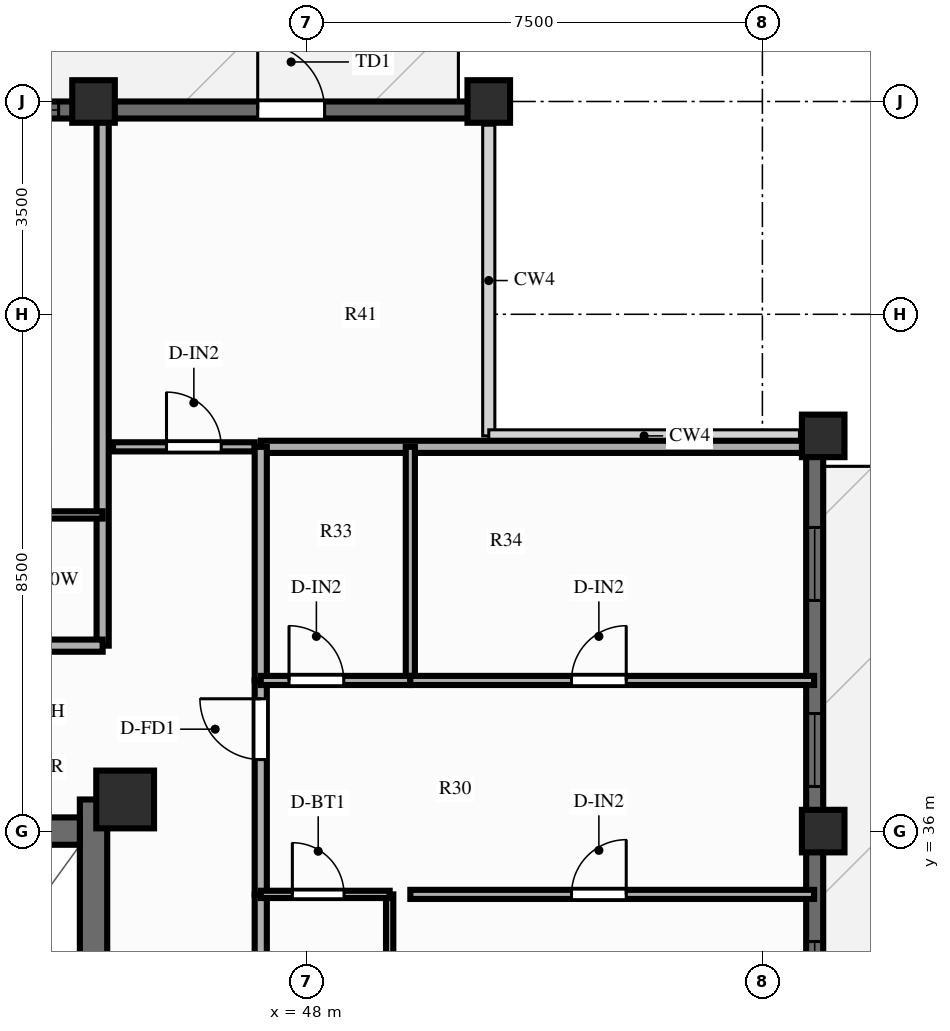
"""IFC4 building model, lengths in metres.
Left out: names, types, materials, properties, quantities, classifications, styles, units other than length and angle.
Written with IfcOpenShell. Run it as: python <this file> out.ifc"""

import sys

from ifc_helpers import new_model, si_unit, direction, frame, frame_2d, origin, origin_2d, place, context, subcontext, project, spatial, rectangle, extrude, source, transform, mapped, element, fill, save


model = new_model("IFC4")
c1 = context("Model", 3, precision=1e-05, world=origin(), true_north=direction((0.0, 1.0)))
c2 = subcontext(c1, "Body", "Model", "MODEL_VIEW")
j1 = project(units=[si_unit("LENGTHUNIT", "METRE"), si_unit("PLANEANGLEUNIT", "RADIAN")], contexts=[c1])
p1 = place(None, origin())
s1 = spatial("IfcSite", under=j1, at=p1, CompositionType="ELEMENT")
p2 = place(p1, origin())
s2 = spatial("IfcBuilding", under=s1, at=p2, CompositionType="ELEMENT")
p3 = place(p2, frame((0.0, 0.0, 216.3)))
s3 = spatial("IfcBuildingStorey", under=s2, at=p3, CompositionType="ELEMENT", Elevation=216.3)
p4 = place(p3, frame((44.5, 17.48, 0.0), z_axis=(0.0, 0.0, 1.0), x_axis=(0.0, 1.0, 0.0)))
e1 = element("IfcWall", 1, at=p4, inside=s3, PredefinedType="SHEAR", context=c2, shape_type="SweptSolid", body=[
    extrude(rectangle(XDim=19.04, YDim=0.45, at=frame_2d((9.52, 0.0))), origin(), (0.0, 0.0, 1.0), 3.9),
])
p5 = place(p4, frame((12.67, 0.0, 0.0), z_axis=(0.0, 0.0, 1.0), x_axis=(-1.0, 0.0, 0.0)))
e2 = element("IfcOpeningElement", 2, at=p5, cuts=e1, PredefinedType="OPENING", context=c2, shape_type="SweptSolid", body=[
    extrude(rectangle(XDim=1.1, YDim=2.15, at=frame_2d((0.55, 1.075))), frame((0.0, 0.237, 0.0), z_axis=(0.0, -1.0, 0.0), x_axis=(1.0, 0.0, 0.0)), (0.0, 0.0, 1.0), 0.474),
])
p6 = place(p3, frame((31.725, 36.0, 0.0), z_axis=(0.0, 0.0, 1.0), x_axis=(1.0, 0.0, 0.0)))
e3 = element("IfcWall", 3, at=p6, inside=s3, PredefinedType="SHEAR", context=c2, shape_type="SweptSolid", body=[
    extrude(rectangle(XDim=12.55, YDim=0.45, at=frame_2d((6.275, 0.0))), origin(), (0.0, 0.0, 1.0), 3.9),
])
p7 = place(p6, frame((5.225, 0.0, 0.0), z_axis=(0.0, 0.0, 1.0), x_axis=(-1.0, 0.0, 0.0)))
e4 = element("IfcOpeningElement", 4, at=p7, cuts=e3, PredefinedType="OPENING", context=c2, shape_type="SweptSolid", body=[
    extrude(rectangle(XDim=1.4, YDim=2.15, at=frame_2d((0.7, 1.075))), frame((0.0, 0.237, 0.0), z_axis=(0.0, -1.0, 0.0), x_axis=(1.0, 0.0, 0.0)), (0.0, 0.0, 1.0), 0.474),
])
m1 = source(origin(), c2, "Body", "SweptSolid", [
    extrude(rectangle(XDim=0.95, YDim=0.95, at=origin_2d()), origin(), (0.0, 0.0, 1.0), 3.9),
])
p8 = place(p3, frame((45.02, 36.52, 0.0), z_axis=(0.0, 0.0, 1.0), x_axis=(1.0, 0.0, 0.0)))
e5 = element("IfcColumn", 5, at=p8, inside=s3, PredefinedType="COLUMN", context=c2, shape_type="MappedRepresentation", body=[
    mapped(m1, transform((0.0, 0.0, 0.0), scale=1.0)),
])
m2 = source(origin(), c2, "Body", "SweptSolid", [
    extrude(rectangle(XDim=0.7, YDim=0.7, at=origin_2d()), origin(), (0.0, 0.0, 1.0), 3.9),
])
for number, where, z_axis, x_axis in (
    (6, (56.5, 36.0, 0.0), (0.0, 0.0, 1.0), (1.0, 0.0, 0.0)),
    (7, (56.5, 42.5, 0.0), (0.0, 0.0, 1.0), (1.0, 0.0, 0.0)),
    (8, (51.0, 48.0, 0.0), (0.0, 0.0, 1.0), (1.0, 0.0, 0.0)),
    (9, (44.5, 48.0, 0.0), (0.0, 0.0, 1.0), (1.0, 0.0, 0.0)),
):
    element("IfcColumn", number, at=place(p3, frame(where, z_axis=z_axis, x_axis=x_axis)), inside=s3, PredefinedType="COLUMN", context=c2, shape_type="MappedRepresentation", body=[
        mapped(m2, transform((0.0, 0.0, 0.0), scale=1.0)),
    ])
p9 = place(p3, frame((25.0, 47.86, 0.0), z_axis=(0.0, 0.0, 1.0), x_axis=(1.0, 0.0, 0.0)))
e10 = element("IfcWall", 10, at=p9, inside=s3, PredefinedType="SOLIDWALL", context=c2, shape_type="SweptSolid", body=[
    extrude(rectangle(XDim=26.0, YDim=0.28, at=frame_2d((13.0, 0.0))), origin(), (0.0, 0.0, 1.0), 2.44),
])
p10 = place(p9, frame((2.65, 0.0, 0.25)))
e11 = element("IfcOpeningElement", 11, at=p10, cuts=e10, PredefinedType="OPENING", context=c2, shape_type="SweptSolid", body=[
    extrude(rectangle(XDim=1.2, YDim=1.5, at=frame_2d((0.6, 0.75))), frame((0.0, 0.152, 0.0), z_axis=(0.0, -1.0, 0.0), x_axis=(1.0, 0.0, 0.0)), (0.0, 0.0, 1.0), 0.304),
])
p11 = place(p9, frame((7.12, 0.0, 0.25)))
e12 = element("IfcOpeningElement", 12, at=p11, cuts=e10, PredefinedType="OPENING", context=c2, shape_type="SweptSolid", body=[
    extrude(rectangle(XDim=0.95, YDim=1.5, at=frame_2d((0.475, 0.75))), frame((0.0, 0.152, 0.0), z_axis=(0.0, -1.0, 0.0), x_axis=(1.0, 0.0, 0.0)), (0.0, 0.0, 1.0), 0.304),
])
p12 = place(p9, frame((9.311, 0.0, 0.25)))
e13 = element("IfcOpeningElement", 13, at=p12, cuts=e10, PredefinedType="OPENING", context=c2, shape_type="SweptSolid", body=[
    extrude(rectangle(XDim=1.2, YDim=1.5, at=frame_2d((0.6, 0.75))), frame((0.0, 0.152, 0.0), z_axis=(0.0, -1.0, 0.0), x_axis=(1.0, 0.0, 0.0)), (0.0, 0.0, 1.0), 0.304),
])
p13 = place(p9, frame((12.377, 0.0, 0.25)))
e14 = element("IfcOpeningElement", 14, at=p13, cuts=e10, PredefinedType="OPENING", context=c2, shape_type="SweptSolid", body=[
    extrude(rectangle(XDim=1.2, YDim=1.5, at=frame_2d((0.6, 0.75))), frame((0.0, 0.152, 0.0), z_axis=(0.0, -1.0, 0.0), x_axis=(1.0, 0.0, 0.0)), (0.0, 0.0, 1.0), 0.304),
])
p14 = place(p9, frame((15.387, 0.0, 0.25)))
e15 = element("IfcOpeningElement", 15, at=p14, cuts=e10, PredefinedType="OPENING", context=c2, shape_type="SweptSolid", body=[
    extrude(rectangle(XDim=1.2, YDim=1.5, at=frame_2d((0.6, 0.75))), frame((0.0, 0.152, 0.0), z_axis=(0.0, -1.0, 0.0), x_axis=(1.0, 0.0, 0.0)), (0.0, 0.0, 1.0), 0.304),
])
p15 = place(p9, frame((17.726, 0.0, 0.25)))
e16 = element("IfcOpeningElement", 16, at=p15, cuts=e10, PredefinedType="OPENING", context=c2, shape_type="SweptSolid", body=[
    extrude(rectangle(XDim=1.2, YDim=1.5, at=frame_2d((0.6, 0.75))), frame((0.0, 0.152, 0.0), z_axis=(0.0, -1.0, 0.0), x_axis=(1.0, 0.0, 0.0)), (0.0, 0.0, 1.0), 0.304),
])
p16 = place(p9, frame((22.2, 0.0, 0.0)))
e17 = element("IfcOpeningElement", 17, at=p16, cuts=e10, PredefinedType="OPENING", context=c2, shape_type="SweptSolid", body=[
    extrude(rectangle(XDim=1.1, YDim=2.15, at=frame_2d((0.55, 1.075))), frame((0.0, 0.152, 0.0), z_axis=(0.0, -1.0, 0.0), x_axis=(1.0, 0.0, 0.0)), (0.0, 0.0, 1.0), 0.304),
])
p17 = place(p3, frame((56.36, 11.5, 0.0), z_axis=(0.0, 0.0, 1.0), x_axis=(0.0, 1.0, 0.0)))
e18 = element("IfcWall", 18, at=p17, inside=s3, PredefinedType="SOLIDWALL", context=c2, shape_type="SweptSolid", body=[
    extrude(rectangle(XDim=31.0, YDim=0.28, at=frame_2d((15.5, 0.0))), origin(), (0.0, 0.0, 1.0), 2.44),
])
p18 = place(p17, frame((0.96, 0.0, 0.25)))
e19 = element("IfcOpeningElement", 19, at=p18, cuts=e18, PredefinedType="OPENING", context=c2, shape_type="SweptSolid", body=[
    extrude(rectangle(XDim=1.2, YDim=1.5, at=frame_2d((0.6, 0.75))), frame((0.0, 0.152, 0.0), z_axis=(0.0, -1.0, 0.0), x_axis=(1.0, 0.0, 0.0)), (0.0, 0.0, 1.0), 0.304),
])
p19 = place(p17, frame((4.02, 0.0, 0.25)))
e20 = element("IfcOpeningElement", 20, at=p19, cuts=e18, PredefinedType="OPENING", context=c2, shape_type="SweptSolid", body=[
    extrude(rectangle(XDim=1.2, YDim=1.5, at=frame_2d((0.6, 0.75))), frame((0.0, 0.152, 0.0), z_axis=(0.0, -1.0, 0.0), x_axis=(1.0, 0.0, 0.0)), (0.0, 0.0, 1.0), 0.304),
])
p20 = place(p17, frame((8.089, 0.0, 0.25)))
e21 = element("IfcOpeningElement", 21, at=p20, cuts=e18, PredefinedType="OPENING", context=c2, shape_type="SweptSolid", body=[
    extrude(rectangle(XDim=1.2, YDim=1.5, at=frame_2d((0.6, 0.75))), frame((0.0, 0.152, 0.0), z_axis=(0.0, -1.0, 0.0), x_axis=(1.0, 0.0, 0.0)), (0.0, 0.0, 1.0), 0.304),
])
p21 = place(p17, frame((11.373, 0.0, 0.25)))
e22 = element("IfcOpeningElement", 22, at=p21, cuts=e18, PredefinedType="OPENING", context=c2, shape_type="SweptSolid", body=[
    extrude(rectangle(XDim=1.2, YDim=1.5, at=frame_2d((0.6, 0.75))), frame((0.0, 0.152, 0.0), z_axis=(0.0, -1.0, 0.0), x_axis=(1.0, 0.0, 0.0)), (0.0, 0.0, 1.0), 0.304),
])
p22 = place(p17, frame((15.907, 0.0, 0.0), z_axis=(0.0, 0.0, 1.0), x_axis=(-1.0, 0.0, 0.0)))
e23 = element("IfcOpeningElement", 23, at=p22, cuts=e18, PredefinedType="OPENING", context=c2, shape_type="SweptSolid", body=[
    extrude(rectangle(XDim=1.6, YDim=2.15, at=frame_2d((0.8, 1.075))), frame((0.0, 0.152, 0.0), z_axis=(0.0, -1.0, 0.0), x_axis=(1.0, 0.0, 0.0)), (0.0, 0.0, 1.0), 0.304),
])
p23 = place(p17, frame((18.188, 0.0, 0.25)))
e24 = element("IfcOpeningElement", 24, at=p23, cuts=e18, PredefinedType="OPENING", context=c2, shape_type="SweptSolid", body=[
    extrude(rectangle(XDim=1.2, YDim=1.5, at=frame_2d((0.6, 0.75))), frame((0.0, 0.152, 0.0), z_axis=(0.0, -1.0, 0.0), x_axis=(1.0, 0.0, 0.0)), (0.0, 0.0, 1.0), 0.304),
])
p24 = place(p17, frame((21.484, 0.0, 0.25)))
e25 = element("IfcOpeningElement", 25, at=p24, cuts=e18, PredefinedType="OPENING", context=c2, shape_type="SweptSolid", body=[
    extrude(rectangle(XDim=1.2, YDim=1.5, at=frame_2d((0.6, 0.75))), frame((0.0, 0.152, 0.0), z_axis=(0.0, -1.0, 0.0), x_axis=(1.0, 0.0, 0.0)), (0.0, 0.0, 1.0), 0.304),
])
p25 = place(p17, frame((25.234, 0.0, 0.25)))
e26 = element("IfcOpeningElement", 26, at=p25, cuts=e18, PredefinedType="OPENING", context=c2, shape_type="SweptSolid", body=[
    extrude(rectangle(XDim=1.2, YDim=1.5, at=frame_2d((0.6, 0.75))), frame((0.0, 0.152, 0.0), z_axis=(0.0, -1.0, 0.0), x_axis=(1.0, 0.0, 0.0)), (0.0, 0.0, 1.0), 0.304),
])
p26 = place(p17, frame((28.294, 0.0, 0.25)))
e27 = element("IfcOpeningElement", 27, at=p26, cuts=e18, PredefinedType="OPENING", context=c2, shape_type="SweptSolid", body=[
    extrude(rectangle(XDim=1.2, YDim=1.5, at=frame_2d((0.6, 0.75))), frame((0.0, 0.152, 0.0), z_axis=(0.0, -1.0, 0.0), x_axis=(1.0, 0.0, 0.0)), (0.0, 0.0, 1.0), 0.304),
])
p27 = place(p3, frame((44.82, 42.32, 0.0), z_axis=(0.0, 0.0, 1.0), x_axis=(1.0, 0.0, 0.0)))
e28 = element("IfcWall", 28, at=p27, inside=s3, PredefinedType="PARTITIONING", context=c2, shape_type="SweptSolid", body=[
    extrude(rectangle(XDim=2.33, YDim=0.15, at=frame_2d((1.165, 0.0))), origin(), (0.0, 0.0, 1.0), 2.24),
])
p28 = place(p27, frame((0.88, 0.0, 0.0)))
e29 = element("IfcOpeningElement", 29, at=p28, cuts=e28, PredefinedType="OPENING", context=c2, shape_type="SweptSolid", body=[
    extrude(rectangle(XDim=0.9, YDim=2.1, at=frame_2d((0.45, 1.05))), frame((0.0, 0.087, 0.0), z_axis=(0.0, -1.0, 0.0), x_axis=(1.0, 0.0, 0.0)), (0.0, 0.0, 1.0), 0.174),
])
p29 = place(p3, frame((44.65, 39.05, 0.0), z_axis=(0.0, 0.0, 1.0), x_axis=(0.0, 1.0, 0.0)))
e30 = element("IfcWall", 30, at=p29, inside=s3, PredefinedType="PARTITIONING", context=c2, shape_type="SweptSolid", body=[
    extrude(rectangle(XDim=8.8, YDim=0.2, at=frame_2d((4.4, 0.0))), origin(), (0.0, 0.0, 1.0), 2.44),
])
p30 = place(p3, frame((42.342, 39.05, 0.0), z_axis=(0.0, 0.0, 1.0), x_axis=(1.0, 0.0, 0.0)))
e31 = element("IfcWall", 31, at=p30, inside=s3, PredefinedType="PARTITIONING", context=c2, shape_type="SweptSolid", body=[
    extrude(rectangle(XDim=2.308, YDim=0.2, at=frame_2d((1.154, 0.0))), origin(), (0.0, 0.0, 1.0), 3.56),
])
p31 = place(p3, frame((42.342, 41.2, 0.0), z_axis=(0.0, 0.0, 1.0), x_axis=(1.0, 0.0, 0.0)))
e32 = element("IfcWall", 32, at=p31, inside=s3, PredefinedType="PARTITIONING", context=c2, shape_type="SweptSolid", body=[
    extrude(rectangle(XDim=2.308, YDim=0.12, at=frame_2d((1.154, 0.0))), origin(), (0.0, 0.0, 1.0), 3.56),
])
p32 = place(p3, frame((47.25, 42.32, 0.0), z_axis=(0.0, 0.0, 1.0), x_axis=(1.0, 0.0, 0.0)))
e33 = element("IfcWall", 33, at=p32, inside=s3, PredefinedType="PARTITIONING", context=c2, shape_type="SweptSolid", body=[
    extrude(rectangle(XDim=9.1, YDim=0.2, at=frame_2d((4.55, 0.0))), origin(), (0.0, 0.0, 1.0), 2.24),
])
p33 = place(p3, frame((47.25, 32.209, 0.0), z_axis=(0.0, 0.0, 1.0), x_axis=(0.0, 1.0, 0.0)))
e34 = element("IfcWall", 34, at=p33, inside=s3, PredefinedType="PARTITIONING", context=c2, shape_type="SweptSolid", body=[
    extrude(rectangle(XDim=2.75, YDim=0.2, at=frame_2d((1.375, 0.0))), origin(), (0.0, 0.0, 1.0), 3.56),
])
p34 = place(p3, frame((47.25, 34.959, 0.0), z_axis=(0.0, 0.0, 1.0), x_axis=(0.0, 1.0, 0.0)))
e35 = element("IfcWall", 35, at=p34, inside=s3, PredefinedType="PARTITIONING", context=c2, shape_type="SweptSolid", body=[
    extrude(rectangle(XDim=3.519, YDim=0.2, at=frame_2d((1.76, 0.0))), origin(), (0.0, 0.0, 1.0), 3.56),
])
p35 = place(p34, frame((2.217, 0.0, 0.0)))
e36 = element("IfcOpeningElement", 36, at=p35, cuts=e35, PredefinedType="OPENING", context=c2, shape_type="SweptSolid", body=[
    extrude(rectangle(XDim=1.0, YDim=2.15, at=frame_2d((0.5, 1.075))), frame((0.0, 0.112, 0.0), z_axis=(0.0, -1.0, 0.0), x_axis=(1.0, 0.0, 0.0)), (0.0, 0.0, 1.0), 0.224),
])
p36 = place(p3, frame((47.25, 38.478, 0.0), z_axis=(0.0, 0.0, 1.0), x_axis=(0.0, 1.0, 0.0)))
e37 = element("IfcWall", 37, at=p36, inside=s3, PredefinedType="PARTITIONING", context=c2, shape_type="SweptSolid", body=[
    extrude(rectangle(XDim=3.842, YDim=0.2, at=frame_2d((1.921, 0.0))), origin(), (0.0, 0.0, 1.0), 3.56),
])
p37 = place(p3, frame((49.37, 32.209, 0.0), z_axis=(0.0, 0.0, 1.0), x_axis=(0.0, 1.0, 0.0)))
e38 = element("IfcWall", 38, at=p37, inside=s3, PredefinedType="PARTITIONING", context=c2, shape_type="SweptSolid", body=[
    extrude(rectangle(XDim=2.75, YDim=0.12, at=frame_2d((1.375, 0.0))), origin(), (0.0, 0.0, 1.0), 3.56),
])
p38 = place(p3, frame((49.71, 38.478, 0.0), z_axis=(0.0, 0.0, 1.0), x_axis=(0.0, 1.0, 0.0)))
e39 = element("IfcWall", 39, at=p38, inside=s3, PredefinedType="PARTITIONING", context=c2, shape_type="SweptSolid", body=[
    extrude(rectangle(XDim=3.842, YDim=0.15, at=frame_2d((1.921, 0.0))), origin(), (0.0, 0.0, 1.0), 2.24),
])
p39 = place(p3, frame((47.25, 34.959, 0.0), z_axis=(0.0, 0.0, 1.0), x_axis=(1.0, 0.0, 0.0)))
e40 = element("IfcWall", 40, at=p39, inside=s3, PredefinedType="PARTITIONING", context=c2, shape_type="SweptSolid", body=[
    extrude(rectangle(XDim=2.12, YDim=0.12, at=frame_2d((1.06, 0.0))), origin(), (0.0, 0.0, 1.0), 3.56),
])
p40 = place(p39, frame((0.52, 0.0, 0.0)))
e41 = element("IfcOpeningElement", 41, at=p40, cuts=e40, PredefinedType="OPENING", context=c2, shape_type="SweptSolid", body=[
    extrude(rectangle(XDim=0.85, YDim=2.05, at=frame_2d((0.425, 1.025))), frame((0.0, 0.072, 0.0), z_axis=(0.0, -1.0, 0.0), x_axis=(1.0, 0.0, 0.0)), (0.0, 0.0, 1.0), 0.144),
])
p41 = place(p3, frame((49.71, 34.959, 0.0), z_axis=(0.0, 0.0, 1.0), x_axis=(1.0, 0.0, 0.0)))
e42 = element("IfcWall", 42, at=p41, inside=s3, PredefinedType="PARTITIONING", context=c2, shape_type="SweptSolid", body=[
    extrude(rectangle(XDim=6.64, YDim=0.15, at=frame_2d((3.32, 0.0))), origin(), (0.0, 0.0, 1.0), 3.56),
])
p42 = place(p41, frame((2.651, 0.0, 0.0)))
e43 = element("IfcOpeningElement", 43, at=p42, cuts=e42, PredefinedType="OPENING", context=c2, shape_type="SweptSolid", body=[
    extrude(rectangle(XDim=0.9, YDim=2.1, at=frame_2d((0.45, 1.05))), frame((0.0, 0.087, 0.0), z_axis=(0.0, -1.0, 0.0), x_axis=(1.0, 0.0, 0.0)), (0.0, 0.0, 1.0), 0.174),
])
p43 = place(p3, frame((47.25, 38.478, 0.0), z_axis=(0.0, 0.0, 1.0), x_axis=(1.0, 0.0, 0.0)))
e44 = element("IfcWall", 44, at=p43, inside=s3, PredefinedType="PARTITIONING", context=c2, shape_type="SweptSolid", body=[
    extrude(rectangle(XDim=2.46, YDim=0.15, at=frame_2d((1.23, 0.0))), origin(), (0.0, 0.0, 1.0), 3.56),
])
p44 = place(p43, frame((0.465, 0.0, 0.0)))
e45 = element("IfcOpeningElement", 45, at=p44, cuts=e44, PredefinedType="OPENING", context=c2, shape_type="SweptSolid", body=[
    extrude(rectangle(XDim=0.9, YDim=2.1, at=frame_2d((0.45, 1.05))), frame((0.0, 0.087, 0.0), z_axis=(0.0, -1.0, 0.0), x_axis=(1.0, 0.0, 0.0)), (0.0, 0.0, 1.0), 0.174),
])
p45 = place(p3, frame((49.71, 38.478, 0.0), z_axis=(0.0, 0.0, 1.0), x_axis=(1.0, 0.0, 0.0)))
e46 = element("IfcWall", 46, at=p45, inside=s3, PredefinedType="PARTITIONING", context=c2, shape_type="SweptSolid", body=[
    extrude(rectangle(XDim=6.64, YDim=0.15, at=frame_2d((3.32, 0.0))), origin(), (0.0, 0.0, 1.0), 3.56),
])
p46 = place(p45, frame((2.651, 0.0, 0.0)))
e47 = element("IfcOpeningElement", 47, at=p46, cuts=e46, PredefinedType="OPENING", context=c2, shape_type="SweptSolid", body=[
    extrude(rectangle(XDim=0.9, YDim=2.1, at=frame_2d((0.45, 1.05))), frame((0.0, 0.087, 0.0), z_axis=(0.0, -1.0, 0.0), x_axis=(1.0, 0.0, 0.0)), (0.0, 0.0, 1.0), 0.174),
])
m3 = source(origin(), c2, "Body", "SweptSolid", [
    extrude(rectangle(XDim=1.2, YDim=1.5, at=frame_2d((0.6, 0.75))), frame((0.0, 0.03, 0.0), z_axis=(0.0, -1.0, 0.0), x_axis=(1.0, 0.0, 0.0)), (0.0, 0.0, 1.0), 0.06),
])
p47 = place(p15, origin())
e48 = element("IfcWindow", 48, at=p47, inside=s3, PartitioningType="SINGLE_PANEL", PredefinedType="WINDOW", context=c2, shape_type="MappedRepresentation", body=[
    mapped(m3, transform((0.0, 0.0, 0.0), scale=1.0)),
])
fill(e16, e48)
m4 = source(origin(), c2, "Body", "SweptSolid", [
    extrude(rectangle(XDim=1.1, YDim=2.15, at=frame_2d((0.55, 1.075))), frame((0.0, 0.025, 0.0), z_axis=(0.0, -1.0, 0.0), x_axis=(1.0, 0.0, 0.0)), (0.0, 0.0, 1.0), 0.05),
])
p48 = place(p16, origin())
e49 = element("IfcDoor", 49, at=p48, inside=s3, OperationType="SINGLE_SWING_LEFT", PredefinedType="DOOR", context=c2, shape_type="MappedRepresentation", body=[
    mapped(m4, transform((0.0, 0.0, 0.0), scale=1.0)),
])
fill(e17, e49)
p49 = place(p24, origin())
e50 = element("IfcWindow", 50, at=p49, inside=s3, PartitioningType="SINGLE_PANEL", PredefinedType="WINDOW", context=c2, shape_type="MappedRepresentation", body=[
    mapped(m3, transform((0.0, 0.0, 0.0), scale=1.0)),
])
fill(e25, e50)
p50 = place(p25, origin())
e51 = element("IfcWindow", 51, at=p50, inside=s3, PartitioningType="SINGLE_PANEL", PredefinedType="WINDOW", context=c2, shape_type="MappedRepresentation", body=[
    mapped(m3, transform((0.0, 0.0, 0.0), scale=1.0)),
])
fill(e26, e51)
p51 = place(p26, origin())
e52 = element("IfcWindow", 52, at=p51, inside=s3, PartitioningType="SINGLE_PANEL", PredefinedType="WINDOW", context=c2, shape_type="MappedRepresentation", body=[
    mapped(m3, transform((0.0, 0.0, 0.0), scale=1.0)),
])
fill(e27, e52)
m5 = source(origin(), c2, "Body", "SweptSolid", [
    extrude(rectangle(XDim=0.9, YDim=2.1, at=frame_2d((0.45, 1.05))), frame((0.0, 0.025, 0.0), z_axis=(0.0, -1.0, 0.0), x_axis=(1.0, 0.0, 0.0)), (0.0, 0.0, 1.0), 0.05),
])
p52 = place(p28, origin())
e53 = element("IfcDoor", 53, at=p52, inside=s3, OperationType="SINGLE_SWING_LEFT", PredefinedType="DOOR", context=c2, shape_type="MappedRepresentation", body=[
    mapped(m5, transform((0.0, 0.0, 0.0), scale=1.0)),
])
fill(e29, e53)
m6 = source(origin(), c2, "Body", "SweptSolid", [
    extrude(rectangle(XDim=1.0, YDim=2.15, at=frame_2d((0.5, 1.075))), frame((0.0, 0.025, 0.0), z_axis=(0.0, -1.0, 0.0), x_axis=(1.0, 0.0, 0.0)), (0.0, 0.0, 1.0), 0.05),
])
p53 = place(p35, origin())
e54 = element("IfcDoor", 54, at=p53, inside=s3, OperationType="SINGLE_SWING_RIGHT", PredefinedType="DOOR", context=c2, shape_type="MappedRepresentation", body=[
    mapped(m6, transform((0.0, 0.0, 0.0), scale=1.0)),
])
fill(e36, e54)
m7 = source(origin(), c2, "Body", "SweptSolid", [
    extrude(rectangle(XDim=0.85, YDim=2.05, at=frame_2d((0.425, 1.025))), frame((0.0, 0.025, 0.0), z_axis=(0.0, -1.0, 0.0), x_axis=(1.0, 0.0, 0.0)), (0.0, 0.0, 1.0), 0.05),
])
p54 = place(p40, origin())
e55 = element("IfcDoor", 55, at=p54, inside=s3, OperationType="SINGLE_SWING_LEFT", PredefinedType="DOOR", context=c2, shape_type="MappedRepresentation", body=[
    mapped(m7, transform((0.0, 0.0, 0.0), scale=1.0)),
])
fill(e41, e55)
p55 = place(p42, origin())
e56 = element("IfcDoor", 56, at=p55, inside=s3, OperationType="SINGLE_SWING_RIGHT", PredefinedType="DOOR", context=c2, shape_type="MappedRepresentation", body=[
    mapped(m5, transform((0.0, 0.0, 0.0), scale=1.0)),
])
fill(e43, e56)
p56 = place(p44, origin())
e57 = element("IfcDoor", 57, at=p56, inside=s3, OperationType="SINGLE_SWING_LEFT", PredefinedType="DOOR", context=c2, shape_type="MappedRepresentation", body=[
    mapped(m5, transform((0.0, 0.0, 0.0), scale=1.0)),
])
fill(e45, e57)
p57 = place(p46, origin())
e58 = element("IfcDoor", 58, at=p57, inside=s3, OperationType="SINGLE_SWING_RIGHT", PredefinedType="DOOR", context=c2, shape_type="MappedRepresentation", body=[
    mapped(m5, transform((0.0, 0.0, 0.0), scale=1.0)),
])
fill(e47, e58)
save(model, sys.argv[1])
